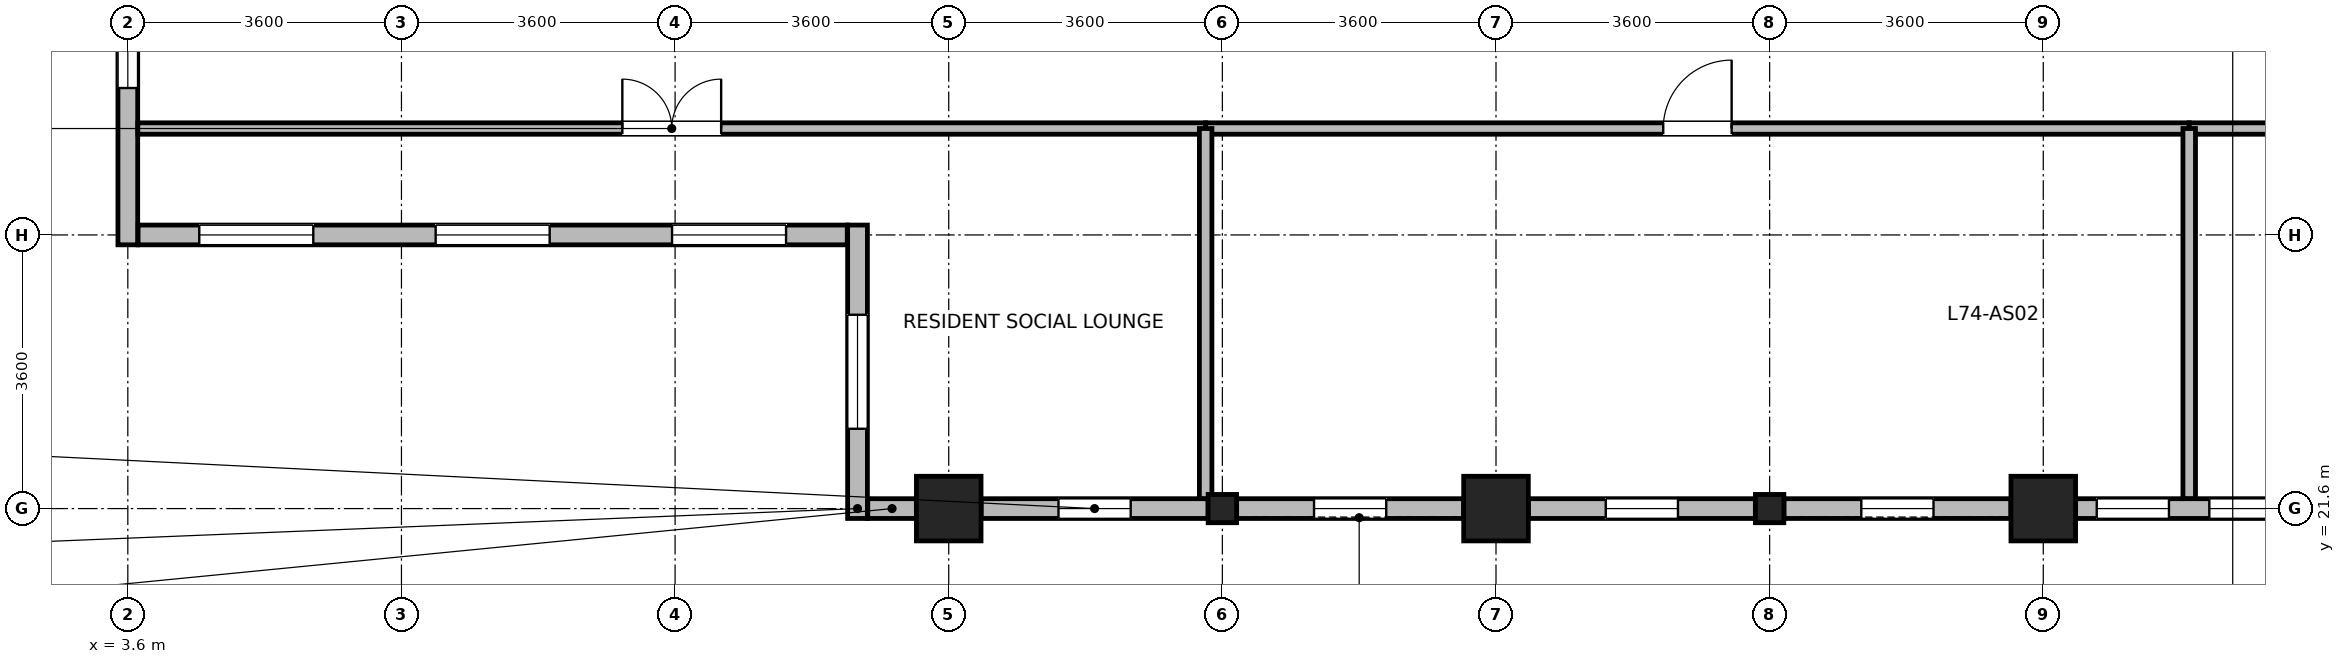
"""IFC4 building model, lengths in metres.
Left out: names, types, materials, properties, quantities, classifications, styles, units other than length and angle.
Written with IfcOpenShell. Run it as: python <this file> out.ifc"""

import sys

from ifc_helpers import new_model, si_unit, direction, frame, frame_2d, origin, origin_2d, place, context, subcontext, project, spatial, rectangle, i_section, extrude, source, transform, mapped, element, fill, save


model = new_model("IFC4")
c1 = context("Model", 3, precision=1e-05, world=origin(), true_north=direction((0.0, 1.0)))
c2 = subcontext(c1, "Body", "Model", "MODEL_VIEW")
j1 = project(units=[si_unit("LENGTHUNIT", "METRE"), si_unit("PLANEANGLEUNIT", "RADIAN")], contexts=[c1])
p1 = place(None, origin())
s1 = spatial("IfcSite", under=j1, at=p1, CompositionType="ELEMENT")
p2 = place(p1, origin())
s2 = spatial("IfcBuilding", under=s1, at=p2, CompositionType="ELEMENT")
p3 = place(p2, frame((0.0, 0.0, 286.9)))
s3 = spatial("IfcBuildingStorey", under=s2, at=p3, CompositionType="ELEMENT", Elevation=286.9)
m1 = source(origin(), c2, "Body", "SweptSolid", [
    extrude(rectangle(XDim=0.85, YDim=0.85, at=origin_2d()), origin(), (0.0, 0.0, 1.0), 3.7),
])
for number, where, z_axis, x_axis in (
    (1, (14.4, 21.6, 0.0), (0.0, 0.0, 1.0), (1.0, 0.0, 0.0)),
    (2, (21.6, 21.6, 0.0), (0.0, 0.0, 1.0), (1.0, 0.0, 0.0)),
    (3, (28.8, 21.6, 0.0), (0.0, 0.0, 1.0), (1.0, 0.0, 0.0)),
):
    element("IfcColumn", number, at=place(p3, frame(where, z_axis=z_axis, x_axis=x_axis)), inside=s3, PredefinedType="COLUMN", context=c2, shape_type="MappedRepresentation", body=[
        mapped(m1, transform((0.0, 0.0, 0.0), x_axis=(1.0, 0.0, 0.0), y_axis=(0.0, 1.0, 0.0), z_axis=(0.0, 0.0, 1.0), scale=1.0)),
    ])
m2 = source(origin(), c2, "Body", "SweptSolid", [
    extrude(i_section(OverallWidth=0.374, OverallDepth=0.372, WebThickness=0.015, FlangeThickness=0.026, FilletRadius=0.015, at=origin_2d()), origin(), (0.0, 0.0, 1.0), 3.7),
])
for number, where, z_axis, x_axis in (
    (4, (18.0, 21.6, 0.0), (0.0, 0.0, 1.0), (1.0, 0.0, 0.0)),
    (5, (25.2, 21.6, 0.0), (0.0, 0.0, 1.0), (1.0, 0.0, 0.0)),
):
    element("IfcColumn", number, at=place(p3, frame(where, z_axis=z_axis, x_axis=x_axis)), inside=s3, PredefinedType="COLUMN", context=c2, shape_type="MappedRepresentation", body=[
        mapped(m2, transform((0.0, 0.0, 0.0), x_axis=(1.0, 0.0, 0.0), y_axis=(0.0, 1.0, 0.0), z_axis=(0.0, 0.0, 1.0), scale=1.0)),
    ])
p4 = place(p3, frame((13.974, 21.6, 0.0), z_axis=(0.0, 0.0, 1.0), x_axis=(-1.0, 0.0, 0.0)))
e6 = element("IfcWall", 6, at=p4, inside=s3, PredefinedType="STANDARD", context=c2, shape_type="SweptSolid", body=[
    extrude(rectangle(XDim=0.639, YDim=0.26, at=frame_2d((0.32, 0.0))), origin(), (0.0, 0.0, 1.0), 3.455),
])
p5 = place(p3, frame((17.812, 21.6, 0.0), z_axis=(0.0, 0.0, 1.0), x_axis=(-1.0, 0.0, 0.0)))
e7 = element("IfcWall", 7, at=p5, inside=s3, PredefinedType="STANDARD", context=c2, shape_type="SweptSolid", body=[
    extrude(rectangle(XDim=2.986, YDim=0.26, at=frame_2d((1.493, 0.0))), origin(), (0.0, 0.0, 1.0), 3.055),
])
p6 = place(p5, frame((1.018, 0.0, 0.85)))
e8 = element("IfcOpeningElement", 8, at=p6, cuts=e7, PredefinedType="OPENING", context=c2, shape_type="SweptSolid", body=[
    extrude(rectangle(XDim=0.95, YDim=1.75, at=frame_2d((0.475, 0.875))), frame((0.0, 0.14, 0.0), z_axis=(0.0, -1.0, 0.0), x_axis=(1.0, 0.0, 0.0)), (0.0, 0.0, 1.0), 0.28),
])
p7 = place(p3, frame((21.174, 21.6, 0.0), z_axis=(0.0, 0.0, 1.0), x_axis=(-1.0, 0.0, 0.0)))
e9 = element("IfcWall", 9, at=p7, inside=s3, PredefinedType="STANDARD", context=c2, shape_type="SweptSolid", body=[
    extrude(rectangle(XDim=2.986, YDim=0.26, at=frame_2d((1.493, 0.0))), origin(), (0.0, 0.0, 1.0), 3.055),
])
p8 = place(p7, frame((1.018, 0.0, 0.85)))
e10 = element("IfcOpeningElement", 10, at=p8, cuts=e9, PredefinedType="OPENING", context=c2, shape_type="SweptSolid", body=[
    extrude(rectangle(XDim=0.95, YDim=1.75, at=frame_2d((0.475, 0.875))), frame((0.0, 0.14, 0.0), z_axis=(0.0, -1.0, 0.0), x_axis=(1.0, 0.0, 0.0)), (0.0, 0.0, 1.0), 0.28),
])
p9 = place(p3, frame((25.012, 21.6, 0.0), z_axis=(0.0, 0.0, 1.0), x_axis=(-1.0, 0.0, 0.0)))
e11 = element("IfcWall", 11, at=p9, inside=s3, PredefinedType="STANDARD", context=c2, shape_type="SweptSolid", body=[
    extrude(rectangle(XDim=2.986, YDim=0.26, at=frame_2d((1.493, 0.0))), origin(), (0.0, 0.0, 1.0), 3.055),
])
p10 = place(p9, frame((1.018, 0.0, 0.85)))
e12 = element("IfcOpeningElement", 12, at=p10, cuts=e11, PredefinedType="OPENING", context=c2, shape_type="SweptSolid", body=[
    extrude(rectangle(XDim=0.95, YDim=1.75, at=frame_2d((0.475, 0.875))), frame((0.0, 0.14, 0.0), z_axis=(0.0, -1.0, 0.0), x_axis=(1.0, 0.0, 0.0)), (0.0, 0.0, 1.0), 0.28),
])
p11 = place(p3, frame((28.374, 21.6, 0.0), z_axis=(0.0, 0.0, 1.0), x_axis=(-1.0, 0.0, 0.0)))
e13 = element("IfcWall", 13, at=p11, inside=s3, PredefinedType="STANDARD", context=c2, shape_type="SweptSolid", body=[
    extrude(rectangle(XDim=2.986, YDim=0.26, at=frame_2d((1.493, 0.0))), origin(), (0.0, 0.0, 1.0), 3.055),
])
p12 = place(p11, frame((1.018, 0.0, 0.85)))
e14 = element("IfcOpeningElement", 14, at=p12, cuts=e13, PredefinedType="OPENING", context=c2, shape_type="SweptSolid", body=[
    extrude(rectangle(XDim=0.95, YDim=1.75, at=frame_2d((0.475, 0.875))), frame((0.0, 0.14, 0.0), z_axis=(0.0, -1.0, 0.0), x_axis=(1.0, 0.0, 0.0)), (0.0, 0.0, 1.0), 0.28),
])
p13 = place(p3, frame((32.212, 21.6, 0.0), z_axis=(0.0, 0.0, 1.0), x_axis=(-1.0, 0.0, 0.0)))
e15 = element("IfcWall", 15, at=p13, inside=s3, PredefinedType="STANDARD", context=c2, shape_type="SweptSolid", body=[
    extrude(rectangle(XDim=2.986, YDim=0.26, at=frame_2d((1.493, 0.0))), origin(), (0.0, 0.0, 1.0), 3.055),
])
p14 = place(p13, frame((0.278, 0.0, 0.85)))
e16 = element("IfcOpeningElement", 16, at=p14, cuts=e15, PredefinedType="OPENING", context=c2, shape_type="SweptSolid", body=[
    extrude(rectangle(XDim=0.95, YDim=1.75, at=frame_2d((0.475, 0.875))), frame((0.0, 0.14, 0.0), z_axis=(0.0, -1.0, 0.0), x_axis=(1.0, 0.0, 0.0)), (0.0, 0.0, 1.0), 0.28),
])
p15 = place(p13, frame((1.759, 0.0, 0.85)))
e17 = element("IfcOpeningElement", 17, at=p15, cuts=e15, PredefinedType="OPENING", context=c2, shape_type="SweptSolid", body=[
    extrude(rectangle(XDim=0.95, YDim=1.75, at=frame_2d((0.475, 0.875))), frame((0.0, 0.14, 0.0), z_axis=(0.0, -1.0, 0.0), x_axis=(1.0, 0.0, 0.0)), (0.0, 0.0, 1.0), 0.28),
])
p16 = place(p3, frame((3.6, 25.07, 0.0), z_axis=(0.0, 0.0, 1.0), x_axis=(0.0, 1.0, 0.0)))
e18 = element("IfcWall", 18, at=p16, inside=s3, PredefinedType="STANDARD", context=c2, shape_type="SweptSolid", body=[
    extrude(rectangle(XDim=3.393, YDim=0.26, at=frame_2d((1.696, 0.0))), origin(), (0.0, 0.0, 1.0), 3.455),
])
p17 = place(p16, frame((2.063, 0.0, 0.85)))
e19 = element("IfcOpeningElement", 19, at=p17, cuts=e18, PredefinedType="OPENING", context=c2, shape_type="SweptSolid", body=[
    extrude(rectangle(XDim=0.95, YDim=1.75, at=frame_2d((0.475, 0.875))), frame((0.0, 0.14, 0.0), z_axis=(0.0, -1.0, 0.0), x_axis=(1.0, 0.0, 0.0)), (0.0, 0.0, 1.0), 0.28),
])
p18 = place(p3, frame((13.065, 25.2, 0.0), z_axis=(0.0, 0.0, 1.0), x_axis=(-1.0, 0.0, 0.0)))
e20 = element("IfcWall", 20, at=p18, inside=s3, PredefinedType="STANDARD", context=c2, shape_type="SweptSolid", body=[
    extrude(rectangle(XDim=9.33, YDim=0.26, at=frame_2d((4.665, 0.0))), origin(), (0.0, 0.0, 1.0), 3.455),
])
p19 = place(p18, frame((0.805, 0.0, 0.85)))
e21 = element("IfcOpeningElement", 21, at=p19, cuts=e20, PredefinedType="OPENING", context=c2, shape_type="SweptSolid", body=[
    extrude(rectangle(XDim=1.5, YDim=1.85, at=frame_2d((0.75, 0.925))), frame((0.0, 0.14, 0.0), z_axis=(0.0, -1.0, 0.0), x_axis=(1.0, 0.0, 0.0)), (0.0, 0.0, 1.0), 0.28),
])
p20 = place(p18, frame((3.915, 0.0, 0.85)))
e22 = element("IfcOpeningElement", 22, at=p20, cuts=e20, PredefinedType="OPENING", context=c2, shape_type="SweptSolid", body=[
    extrude(rectangle(XDim=1.5, YDim=1.85, at=frame_2d((0.75, 0.925))), frame((0.0, 0.14, 0.0), z_axis=(0.0, -1.0, 0.0), x_axis=(1.0, 0.0, 0.0)), (0.0, 0.0, 1.0), 0.28),
])
p21 = place(p18, frame((7.025, 0.0, 0.85)))
e23 = element("IfcOpeningElement", 23, at=p21, cuts=e20, PredefinedType="OPENING", context=c2, shape_type="SweptSolid", body=[
    extrude(rectangle(XDim=1.5, YDim=1.85, at=frame_2d((0.75, 0.925))), frame((0.0, 0.14, 0.0), z_axis=(0.0, -1.0, 0.0), x_axis=(1.0, 0.0, 0.0)), (0.0, 0.0, 1.0), 0.28),
])
p22 = place(p3, frame((13.2, 21.47, 0.0), z_axis=(0.0, 0.0, 1.0), x_axis=(0.0, 1.0, 0.0)))
e24 = element("IfcWall", 24, at=p22, inside=s3, PredefinedType="STANDARD", context=c2, shape_type="SweptSolid", body=[
    extrude(rectangle(XDim=3.86, YDim=0.26, at=frame_2d((1.93, 0.0))), origin(), (0.0, 0.0, 1.0), 3.455),
])
p23 = place(p22, frame((1.18, 0.0, 0.85)))
e25 = element("IfcOpeningElement", 25, at=p23, cuts=e24, PredefinedType="OPENING", context=c2, shape_type="SweptSolid", body=[
    extrude(rectangle(XDim=1.5, YDim=1.85, at=frame_2d((0.75, 0.925))), frame((0.0, 0.14, 0.0), z_axis=(0.0, -1.0, 0.0), x_axis=(1.0, 0.0, 0.0)), (0.0, 0.0, 1.0), 0.28),
])
p24 = place(p3, frame((3.732, 26.6, 0.0), z_axis=(0.0, 0.0, 1.0), x_axis=(1.0, 0.0, 0.0)))
e26 = element("IfcWall", 26, at=p24, inside=s3, PredefinedType="PARTITIONING", context=c2, shape_type="SweptSolid", body=[
    extrude(rectangle(XDim=14.048, YDim=0.15, at=frame_2d((7.024, 0.0))), origin(), (0.0, 0.0, 1.0), 3.455),
])
p25 = place(p24, frame((6.374, 0.0, 0.0)))
e27 = element("IfcOpeningElement", 27, at=p25, cuts=e26, PredefinedType="OPENING", context=c2, shape_type="SweptSolid", body=[
    extrude(rectangle(XDim=1.3, YDim=2.12, at=frame_2d((0.65, 1.06))), frame((0.0, 0.085, 0.0), z_axis=(0.0, -1.0, 0.0), x_axis=(1.0, 0.0, 0.0)), (0.0, 0.0, 1.0), 0.17),
])
p26 = place(p3, frame((17.78, 26.6, 0.0), z_axis=(0.0, 0.0, 1.0), x_axis=(1.0, 0.0, 0.0)))
e28 = element("IfcWall", 28, at=p26, inside=s3, PredefinedType="PARTITIONING", context=c2, shape_type="SweptSolid", body=[
    extrude(rectangle(XDim=12.94, YDim=0.15, at=frame_2d((6.47, 0.0))), origin(), (0.0, 0.0, 1.0), 3.455),
])
p27 = place(p26, frame((6.02, 0.0, 0.0)))
e29 = element("IfcOpeningElement", 29, at=p27, cuts=e28, PredefinedType="OPENING", context=c2, shape_type="SweptSolid", body=[
    extrude(rectangle(XDim=0.9, YDim=2.08, at=frame_2d((0.45, 1.04))), frame((0.0, 0.085, 0.0), z_axis=(0.0, -1.0, 0.0), x_axis=(1.0, 0.0, 0.0)), (0.0, 0.0, 1.0), 0.17),
])
p28 = place(p3, frame((30.72, 26.6, 0.0), z_axis=(0.0, 0.0, 1.0), x_axis=(1.0, 0.0, 0.0)))
e30 = element("IfcWall", 30, at=p28, inside=s3, PredefinedType="PARTITIONING", context=c2, shape_type="SweptSolid", body=[
    extrude(rectangle(XDim=7.08, YDim=0.15, at=frame_2d((3.54, 0.0))), origin(), (0.0, 0.0, 1.0), 3.455),
])
p29 = place(p28, frame((3.065, 0.0, 0.0)))
e31 = element("IfcOpeningElement", 31, at=p29, cuts=e30, PredefinedType="OPENING", context=c2, shape_type="SweptSolid", body=[
    extrude(rectangle(XDim=0.95, YDim=2.1, at=frame_2d((0.475, 1.05))), frame((0.0, 0.085, 0.0), z_axis=(0.0, -1.0, 0.0), x_axis=(1.0, 0.0, 0.0)), (0.0, 0.0, 1.0), 0.17),
])
for number, where, z_axis, x_axis in (
    (32, (17.78, 21.732, 0.0), (0.0, 0.0, 1.0), (0.0, 1.0, 0.0)),
    (33, (30.72, 21.732, 0.0), (0.0, 0.0, 1.0), (0.0, 1.0, 0.0)),
):
    element("IfcWall", number, at=place(p3, frame(where, z_axis=z_axis, x_axis=x_axis)), inside=s3, PredefinedType="PARTITIONING", context=c2, shape_type="SweptSolid", body=[
        extrude(rectangle(XDim=4.868, YDim=0.165, at=frame_2d((2.434, 0.0))), origin(), (0.0, 0.0, 1.0), 3.455),
    ])
p30 = place(p6, origin())
e34 = element("IfcWindow", 34, at=p30, inside=s3, PartitioningType="SINGLE_PANEL", PredefinedType="WINDOW", context=c2, shape_type="SweptSolid", body=[
    extrude(rectangle(XDim=0.95, YDim=1.75, at=frame_2d((0.475, 0.875))), frame((0.0, 0.03, 0.0), z_axis=(0.0, -1.0, 0.0), x_axis=(1.0, 0.0, 0.0)), (0.0, 0.0, 1.0), 0.06),
])
fill(e8, e34)
p31 = place(p8, origin())
e35 = element("IfcWindow", 35, at=p31, inside=s3, PartitioningType="SINGLE_PANEL", PredefinedType="WINDOW", context=c2, shape_type="SweptSolid", body=[
    extrude(rectangle(XDim=0.95, YDim=1.75, at=frame_2d((0.475, 0.875))), frame((0.0, 0.03, 0.0), z_axis=(0.0, -1.0, 0.0), x_axis=(1.0, 0.0, 0.0)), (0.0, 0.0, 1.0), 0.06),
])
fill(e10, e35)
p32 = place(p10, origin())
e36 = element("IfcWindow", 36, at=p32, inside=s3, PartitioningType="SINGLE_PANEL", PredefinedType="WINDOW", context=c2, shape_type="SweptSolid", body=[
    extrude(rectangle(XDim=0.95, YDim=1.75, at=frame_2d((0.475, 0.875))), frame((0.0, 0.03, 0.0), z_axis=(0.0, -1.0, 0.0), x_axis=(1.0, 0.0, 0.0)), (0.0, 0.0, 1.0), 0.06),
])
fill(e12, e36)
p33 = place(p12, origin())
e37 = element("IfcWindow", 37, at=p33, inside=s3, PartitioningType="SINGLE_PANEL", PredefinedType="WINDOW", context=c2, shape_type="SweptSolid", body=[
    extrude(rectangle(XDim=0.95, YDim=1.75, at=frame_2d((0.475, 0.875))), frame((0.0, 0.03, 0.0), z_axis=(0.0, -1.0, 0.0), x_axis=(1.0, 0.0, 0.0)), (0.0, 0.0, 1.0), 0.06),
])
fill(e14, e37)
p34 = place(p14, origin())
e38 = element("IfcWindow", 38, at=p34, inside=s3, PartitioningType="SINGLE_PANEL", PredefinedType="WINDOW", context=c2, shape_type="SweptSolid", body=[
    extrude(rectangle(XDim=0.95, YDim=1.75, at=frame_2d((0.475, 0.875))), frame((0.0, 0.03, 0.0), z_axis=(0.0, -1.0, 0.0), x_axis=(1.0, 0.0, 0.0)), (0.0, 0.0, 1.0), 0.06),
])
fill(e16, e38)
p35 = place(p15, origin())
e39 = element("IfcWindow", 39, at=p35, inside=s3, PartitioningType="SINGLE_PANEL", PredefinedType="WINDOW", context=c2, shape_type="SweptSolid", body=[
    extrude(rectangle(XDim=0.95, YDim=1.75, at=frame_2d((0.475, 0.875))), frame((0.0, 0.03, 0.0), z_axis=(0.0, -1.0, 0.0), x_axis=(1.0, 0.0, 0.0)), (0.0, 0.0, 1.0), 0.06),
])
fill(e17, e39)
p36 = place(p17, origin())
e40 = element("IfcWindow", 40, at=p36, inside=s3, PartitioningType="SINGLE_PANEL", PredefinedType="WINDOW", context=c2, shape_type="SweptSolid", body=[
    extrude(rectangle(XDim=0.95, YDim=1.75, at=frame_2d((0.475, 0.875))), frame((0.0, 0.03, 0.0), z_axis=(0.0, -1.0, 0.0), x_axis=(1.0, 0.0, 0.0)), (0.0, 0.0, 1.0), 0.06),
])
fill(e19, e40)
p37 = place(p19, origin())
e41 = element("IfcWindow", 41, at=p37, inside=s3, PartitioningType="SINGLE_PANEL", PredefinedType="WINDOW", context=c2, shape_type="SweptSolid", body=[
    extrude(rectangle(XDim=1.5, YDim=1.85, at=frame_2d((0.75, 0.925))), frame((0.0, 0.03, 0.0), z_axis=(0.0, -1.0, 0.0), x_axis=(1.0, 0.0, 0.0)), (0.0, 0.0, 1.0), 0.06),
])
fill(e21, e41)
p38 = place(p20, origin())
e42 = element("IfcWindow", 42, at=p38, inside=s3, PartitioningType="SINGLE_PANEL", PredefinedType="WINDOW", context=c2, shape_type="SweptSolid", body=[
    extrude(rectangle(XDim=1.5, YDim=1.85, at=frame_2d((0.75, 0.925))), frame((0.0, 0.03, 0.0), z_axis=(0.0, -1.0, 0.0), x_axis=(1.0, 0.0, 0.0)), (0.0, 0.0, 1.0), 0.06),
])
fill(e22, e42)
p39 = place(p21, origin())
e43 = element("IfcWindow", 43, at=p39, inside=s3, PartitioningType="SINGLE_PANEL", PredefinedType="WINDOW", context=c2, shape_type="SweptSolid", body=[
    extrude(rectangle(XDim=1.5, YDim=1.85, at=frame_2d((0.75, 0.925))), frame((0.0, 0.03, 0.0), z_axis=(0.0, -1.0, 0.0), x_axis=(1.0, 0.0, 0.0)), (0.0, 0.0, 1.0), 0.06),
])
fill(e23, e43)
p40 = place(p23, origin())
e44 = element("IfcWindow", 44, at=p40, inside=s3, PartitioningType="SINGLE_PANEL", PredefinedType="WINDOW", context=c2, shape_type="SweptSolid", body=[
    extrude(rectangle(XDim=1.5, YDim=1.85, at=frame_2d((0.75, 0.925))), frame((0.0, 0.03, 0.0), z_axis=(0.0, -1.0, 0.0), x_axis=(1.0, 0.0, 0.0)), (0.0, 0.0, 1.0), 0.06),
])
fill(e25, e44)
p41 = place(p25, origin())
e45 = element("IfcDoor", 45, at=p41, inside=s3, OperationType="DOUBLE_DOOR_SINGLE_SWING", PredefinedType="DOOR", context=c2, shape_type="SweptSolid", body=[
    extrude(rectangle(XDim=1.3, YDim=2.12, at=frame_2d((0.65, 1.06))), frame((0.0, 0.025, 0.0), z_axis=(0.0, -1.0, 0.0), x_axis=(1.0, 0.0, 0.0)), (0.0, 0.0, 1.0), 0.05),
])
fill(e27, e45)
p42 = place(p27, origin())
e46 = element("IfcDoor", 46, at=p42, inside=s3, OperationType="SINGLE_SWING_RIGHT", PredefinedType="DOOR", context=c2, shape_type="SweptSolid", body=[
    extrude(rectangle(XDim=0.9, YDim=2.08, at=frame_2d((0.45, 1.04))), frame((0.0, 0.025, 0.0), z_axis=(0.0, -1.0, 0.0), x_axis=(1.0, 0.0, 0.0)), (0.0, 0.0, 1.0), 0.05),
])
fill(e29, e46)
save(model, sys.argv[1])
